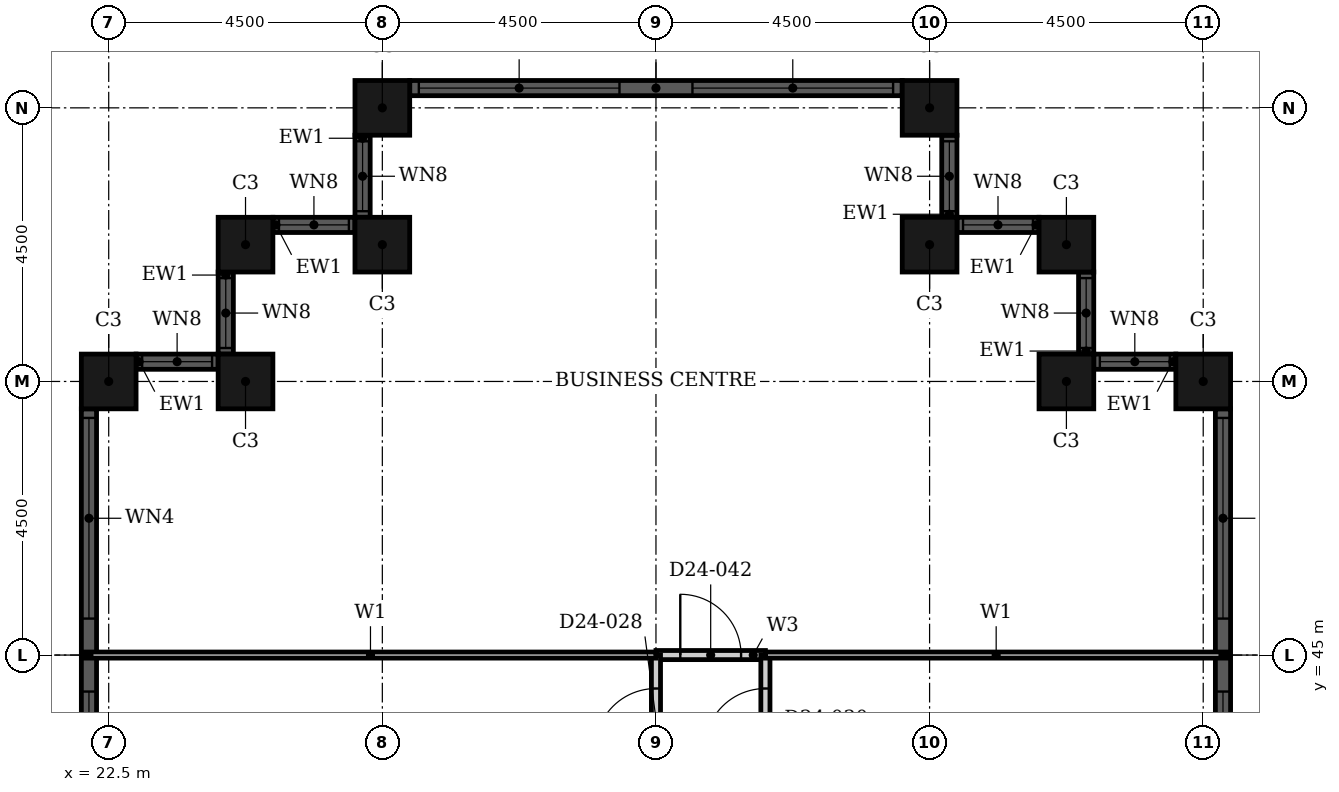
"""IFC4 building model, lengths in metres.
Left out: names, types, materials, properties, quantities, classifications, styles, units other than length and angle.
Written with IfcOpenShell. Run it as: python <this file> out.ifc"""

import sys

from ifc_helpers import new_model, si_unit, direction, frame, frame_2d, origin, origin_2d, place, context, subcontext, project, spatial, rectangle, hollow_rectangle, extrude, element, fill, save


model = new_model("IFC4")
c1 = context("Model", 3, precision=1e-05, world=origin(), true_north=direction((0.0, 1.0)))
c2 = subcontext(c1, "Body", "Model", "MODEL_VIEW")
j1 = project(units=[si_unit("LENGTHUNIT", "METRE"), si_unit("PLANEANGLEUNIT", "RADIAN")], contexts=[c1])
p1 = place(None, origin())
s1 = spatial("IfcSite", under=j1, at=p1, CompositionType="ELEMENT")
p2 = place(p1, origin())
s2 = spatial("IfcBuilding", under=s1, at=p2, CompositionType="ELEMENT")
p3 = place(p2, frame((0.0, 0.0, 100.8)))
s3 = spatial("IfcBuildingStorey", under=s2, at=p3, CompositionType="ELEMENT", Elevation=100.8)
for number, where, z_axis, x_axis in (
    (1, (40.5, 49.5, 0.0), (0.0, 0.0, 1.0), (1.0, 0.0, 0.0)),
    (2, (38.25, 49.5, 0.0), (0.0, 0.0, 1.0), (1.0, 0.0, 0.0)),
    (3, (38.25, 51.75, 0.0), (0.0, 0.0, 1.0), (1.0, 0.0, 0.0)),
    (4, (36.0, 51.75, 0.0), (0.0, 0.0, 1.0), (1.0, 0.0, 0.0)),
    (5, (36.0, 54.0, 0.0), (0.0, 0.0, 1.0), (1.0, 0.0, 0.0)),
    (6, (27.0, 54.0, 0.0), (0.0, 0.0, 1.0), (1.0, 0.0, 0.0)),
    (7, (27.0, 51.75, 0.0), (0.0, 0.0, 1.0), (1.0, 0.0, 0.0)),
    (8, (24.75, 51.75, 0.0), (0.0, 0.0, 1.0), (1.0, 0.0, 0.0)),
    (9, (24.75, 49.5, 0.0), (0.0, 0.0, 1.0), (1.0, 0.0, 0.0)),
    (10, (22.5, 49.5, 0.0), (0.0, 0.0, 1.0), (1.0, 0.0, 0.0)),
):
    element("IfcColumn", number, at=place(p3, frame(where, z_axis=z_axis, x_axis=x_axis)), inside=s3, PredefinedType="COLUMN", context=c2, shape_type="SweptSolid", body=[
        extrude(hollow_rectangle(XDim=0.9, YDim=0.9, WallThickness=0.028, at=origin_2d()), origin(), (0.0, 0.0, 1.0), 3.6),
    ])
p4 = place(p3, frame((40.825, 40.95, 0.0), z_axis=(0.0, 0.0, 1.0), x_axis=(0.0, 1.0, 0.0)))
e11 = element("IfcWall", 11, at=p4, inside=s3, PredefinedType="SOLIDWALL", context=c2, shape_type="SweptSolid", body=[
    extrude(rectangle(XDim=8.1, YDim=0.25, at=frame_2d((4.05, 0.0))), origin(), (0.0, 0.0, 1.0), 3.6),
])
p5 = place(p4, frame((0.15, 0.0, 0.9)))
e12 = element("IfcOpeningElement", 12, at=p5, cuts=e11, PredefinedType="OPENING", context=c2, shape_type="SweptSolid", body=[
    extrude(rectangle(XDim=3.3, YDim=2.08, at=frame_2d((1.65, 1.04))), frame((0.0, 0.135, 0.0), z_axis=(0.0, -1.0, 0.0), x_axis=(1.0, 0.0, 0.0)), (0.0, 0.0, 1.0), 0.27),
])
p6 = place(p4, frame((4.65, 0.0, 0.9)))
e13 = element("IfcOpeningElement", 13, at=p6, cuts=e11, PredefinedType="OPENING", context=c2, shape_type="SweptSolid", body=[
    extrude(rectangle(XDim=3.3, YDim=2.08, at=frame_2d((1.65, 1.04))), frame((0.0, 0.135, 0.0), z_axis=(0.0, -1.0, 0.0), x_axis=(1.0, 0.0, 0.0)), (0.0, 0.0, 1.0), 0.27),
])
p7 = place(p3, frame((40.05, 49.825, 0.0), z_axis=(0.0, 0.0, 1.0), x_axis=(-1.0, 0.0, 0.0)))
e14 = element("IfcWall", 14, at=p7, inside=s3, PredefinedType="SOLIDWALL", context=c2, shape_type="SweptSolid", body=[
    extrude(rectangle(XDim=1.35, YDim=0.25, at=frame_2d((0.675, 0.0))), origin(), (0.0, 0.0, 1.0), 3.6),
])
p8 = place(p7, frame((0.1, 0.0, 0.9)))
e15 = element("IfcOpeningElement", 15, at=p8, cuts=e14, PredefinedType="OPENING", context=c2, shape_type="SweptSolid", body=[
    extrude(rectangle(XDim=1.15, YDim=2.08, at=frame_2d((0.575, 1.04))), frame((0.0, 0.135, 0.0), z_axis=(0.0, -1.0, 0.0), x_axis=(1.0, 0.0, 0.0)), (0.0, 0.0, 1.0), 0.27),
])
p9 = place(p3, frame((38.575, 49.95, 0.0), z_axis=(0.0, 0.0, 1.0), x_axis=(0.0, 1.0, 0.0)))
e16 = element("IfcWall", 16, at=p9, inside=s3, PredefinedType="SOLIDWALL", context=c2, shape_type="SweptSolid", body=[
    extrude(rectangle(XDim=1.35, YDim=0.25, at=frame_2d((0.675, 0.0))), origin(), (0.0, 0.0, 1.0), 3.6),
])
p10 = place(p9, frame((0.1, 0.0, 0.9)))
e17 = element("IfcOpeningElement", 17, at=p10, cuts=e16, PredefinedType="OPENING", context=c2, shape_type="SweptSolid", body=[
    extrude(rectangle(XDim=1.15, YDim=2.08, at=frame_2d((0.575, 1.04))), frame((0.0, 0.135, 0.0), z_axis=(0.0, -1.0, 0.0), x_axis=(1.0, 0.0, 0.0)), (0.0, 0.0, 1.0), 0.27),
])
p11 = place(p3, frame((37.8, 52.075, 0.0), z_axis=(0.0, 0.0, 1.0), x_axis=(-1.0, 0.0, 0.0)))
e18 = element("IfcWall", 18, at=p11, inside=s3, PredefinedType="SOLIDWALL", context=c2, shape_type="SweptSolid", body=[
    extrude(rectangle(XDim=1.35, YDim=0.25, at=frame_2d((0.675, 0.0))), origin(), (0.0, 0.0, 1.0), 3.6),
])
p12 = place(p11, frame((0.1, 0.0, 0.9)))
e19 = element("IfcOpeningElement", 19, at=p12, cuts=e18, PredefinedType="OPENING", context=c2, shape_type="SweptSolid", body=[
    extrude(rectangle(XDim=1.15, YDim=2.08, at=frame_2d((0.575, 1.04))), frame((0.0, 0.135, 0.0), z_axis=(0.0, -1.0, 0.0), x_axis=(1.0, 0.0, 0.0)), (0.0, 0.0, 1.0), 0.27),
])
p13 = place(p3, frame((36.325, 52.2, 0.0), z_axis=(0.0, 0.0, 1.0), x_axis=(0.0, 1.0, 0.0)))
e20 = element("IfcWall", 20, at=p13, inside=s3, PredefinedType="SOLIDWALL", context=c2, shape_type="SweptSolid", body=[
    extrude(rectangle(XDim=1.35, YDim=0.25, at=frame_2d((0.675, 0.0))), origin(), (0.0, 0.0, 1.0), 3.6),
])
p14 = place(p13, frame((0.1, 0.0, 0.9)))
e21 = element("IfcOpeningElement", 21, at=p14, cuts=e20, PredefinedType="OPENING", context=c2, shape_type="SweptSolid", body=[
    extrude(rectangle(XDim=1.15, YDim=2.08, at=frame_2d((0.575, 1.04))), frame((0.0, 0.135, 0.0), z_axis=(0.0, -1.0, 0.0), x_axis=(1.0, 0.0, 0.0)), (0.0, 0.0, 1.0), 0.27),
])
p15 = place(p3, frame((35.55, 54.325, 0.0), z_axis=(0.0, 0.0, 1.0), x_axis=(-1.0, 0.0, 0.0)))
e22 = element("IfcWall", 22, at=p15, inside=s3, PredefinedType="SOLIDWALL", context=c2, shape_type="SweptSolid", body=[
    extrude(rectangle(XDim=8.1, YDim=0.25, at=frame_2d((4.05, 0.0))), origin(), (0.0, 0.0, 1.0), 3.6),
])
p16 = place(p15, frame((0.15, 0.0, 0.9)))
e23 = element("IfcOpeningElement", 23, at=p16, cuts=e22, PredefinedType="OPENING", context=c2, shape_type="SweptSolid", body=[
    extrude(rectangle(XDim=3.3, YDim=2.08, at=frame_2d((1.65, 1.04))), frame((0.0, 0.135, 0.0), z_axis=(0.0, -1.0, 0.0), x_axis=(1.0, 0.0, 0.0)), (0.0, 0.0, 1.0), 0.27),
])
p17 = place(p15, frame((4.65, 0.0, 0.9)))
e24 = element("IfcOpeningElement", 24, at=p17, cuts=e22, PredefinedType="OPENING", context=c2, shape_type="SweptSolid", body=[
    extrude(rectangle(XDim=3.3, YDim=2.08, at=frame_2d((1.65, 1.04))), frame((0.0, 0.135, 0.0), z_axis=(0.0, -1.0, 0.0), x_axis=(1.0, 0.0, 0.0)), (0.0, 0.0, 1.0), 0.27),
])
p18 = place(p3, frame((26.675, 53.55, 0.0), z_axis=(0.0, 0.0, 1.0), x_axis=(0.0, -1.0, 0.0)))
e25 = element("IfcWall", 25, at=p18, inside=s3, PredefinedType="SOLIDWALL", context=c2, shape_type="SweptSolid", body=[
    extrude(rectangle(XDim=1.35, YDim=0.25, at=frame_2d((0.675, 0.0))), origin(), (0.0, 0.0, 1.0), 3.6),
])
p19 = place(p18, frame((0.1, 0.0, 0.9)))
e26 = element("IfcOpeningElement", 26, at=p19, cuts=e25, PredefinedType="OPENING", context=c2, shape_type="SweptSolid", body=[
    extrude(rectangle(XDim=1.15, YDim=2.08, at=frame_2d((0.575, 1.04))), frame((0.0, 0.135, 0.0), z_axis=(0.0, -1.0, 0.0), x_axis=(1.0, 0.0, 0.0)), (0.0, 0.0, 1.0), 0.27),
])
p20 = place(p3, frame((26.55, 52.075, 0.0), z_axis=(0.0, 0.0, 1.0), x_axis=(-1.0, 0.0, 0.0)))
e27 = element("IfcWall", 27, at=p20, inside=s3, PredefinedType="SOLIDWALL", context=c2, shape_type="SweptSolid", body=[
    extrude(rectangle(XDim=1.35, YDim=0.25, at=frame_2d((0.675, 0.0))), origin(), (0.0, 0.0, 1.0), 3.6),
])
p21 = place(p20, frame((0.1, 0.0, 0.9)))
e28 = element("IfcOpeningElement", 28, at=p21, cuts=e27, PredefinedType="OPENING", context=c2, shape_type="SweptSolid", body=[
    extrude(rectangle(XDim=1.15, YDim=2.08, at=frame_2d((0.575, 1.04))), frame((0.0, 0.135, 0.0), z_axis=(0.0, -1.0, 0.0), x_axis=(1.0, 0.0, 0.0)), (0.0, 0.0, 1.0), 0.27),
])
p22 = place(p3, frame((24.425, 51.3, 0.0), z_axis=(0.0, 0.0, 1.0), x_axis=(0.0, -1.0, 0.0)))
e29 = element("IfcWall", 29, at=p22, inside=s3, PredefinedType="SOLIDWALL", context=c2, shape_type="SweptSolid", body=[
    extrude(rectangle(XDim=1.35, YDim=0.25, at=frame_2d((0.675, 0.0))), origin(), (0.0, 0.0, 1.0), 3.6),
])
p23 = place(p22, frame((0.1, 0.0, 0.9)))
e30 = element("IfcOpeningElement", 30, at=p23, cuts=e29, PredefinedType="OPENING", context=c2, shape_type="SweptSolid", body=[
    extrude(rectangle(XDim=1.15, YDim=2.08, at=frame_2d((0.575, 1.04))), frame((0.0, 0.135, 0.0), z_axis=(0.0, -1.0, 0.0), x_axis=(1.0, 0.0, 0.0)), (0.0, 0.0, 1.0), 0.27),
])
p24 = place(p3, frame((24.3, 49.825, 0.0), z_axis=(0.0, 0.0, 1.0), x_axis=(-1.0, 0.0, 0.0)))
e31 = element("IfcWall", 31, at=p24, inside=s3, PredefinedType="SOLIDWALL", context=c2, shape_type="SweptSolid", body=[
    extrude(rectangle(XDim=1.35, YDim=0.25, at=frame_2d((0.675, 0.0))), origin(), (0.0, 0.0, 1.0), 3.6),
])
p25 = place(p24, frame((0.1, 0.0, 0.9)))
e32 = element("IfcOpeningElement", 32, at=p25, cuts=e31, PredefinedType="OPENING", context=c2, shape_type="SweptSolid", body=[
    extrude(rectangle(XDim=1.15, YDim=2.08, at=frame_2d((0.575, 1.04))), frame((0.0, 0.135, 0.0), z_axis=(0.0, -1.0, 0.0), x_axis=(1.0, 0.0, 0.0)), (0.0, 0.0, 1.0), 0.27),
])
p26 = place(p3, frame((22.175, 49.05, 0.0), z_axis=(0.0, 0.0, 1.0), x_axis=(0.0, -1.0, 0.0)))
e33 = element("IfcWall", 33, at=p26, inside=s3, PredefinedType="SOLIDWALL", context=c2, shape_type="SweptSolid", body=[
    extrude(rectangle(XDim=8.1, YDim=0.25, at=frame_2d((4.05, 0.0))), origin(), (0.0, 0.0, 1.0), 3.6),
])
p27 = place(p26, frame((0.15, 0.0, 0.9)))
e34 = element("IfcOpeningElement", 34, at=p27, cuts=e33, PredefinedType="OPENING", context=c2, shape_type="SweptSolid", body=[
    extrude(rectangle(XDim=3.3, YDim=2.08, at=frame_2d((1.65, 1.04))), frame((0.0, 0.135, 0.0), z_axis=(0.0, -1.0, 0.0), x_axis=(1.0, 0.0, 0.0)), (0.0, 0.0, 1.0), 0.27),
])
p28 = place(p26, frame((4.65, 0.0, 0.9)))
e35 = element("IfcOpeningElement", 35, at=p28, cuts=e33, PredefinedType="OPENING", context=c2, shape_type="SweptSolid", body=[
    extrude(rectangle(XDim=3.3, YDim=2.08, at=frame_2d((1.65, 1.04))), frame((0.0, 0.135, 0.0), z_axis=(0.0, -1.0, 0.0), x_axis=(1.0, 0.0, 0.0)), (0.0, 0.0, 1.0), 0.27),
])
p29 = place(p3, frame((31.5, 45.0, 0.0), z_axis=(0.0, 0.0, 1.0), x_axis=(1.0, 0.0, 0.0)))
e36 = element("IfcWall", 36, at=p29, inside=s3, PredefinedType="PARTITIONING", context=c2, shape_type="SweptSolid", body=[
    extrude(rectangle(XDim=1.8, YDim=0.15, at=frame_2d((0.9, 0.0))), origin(), (0.0, 0.0, 1.0), 3.3),
])
p30 = place(p29, frame((0.4, 0.0, 0.0)))
e37 = element("IfcOpeningElement", 37, at=p30, cuts=e36, PredefinedType="OPENING", context=c2, shape_type="SweptSolid", body=[
    extrude(rectangle(XDim=1.0, YDim=2.1, at=frame_2d((0.5, 1.05))), frame((0.0, 0.085, 0.0), z_axis=(0.0, -1.0, 0.0), x_axis=(1.0, 0.0, 0.0)), (0.0, 0.0, 1.0), 0.17),
])
p31 = place(p3, frame((31.5, 33.3, 0.0), z_axis=(0.0, 0.0, 1.0), x_axis=(0.0, 1.0, 0.0)))
e38 = element("IfcWall", 38, at=p31, inside=s3, PredefinedType="PARTITIONING", context=c2, shape_type="SweptSolid", body=[
    extrude(rectangle(XDim=11.7, YDim=0.15, at=frame_2d((5.85, 0.0))), origin(), (0.0, 0.0, 1.0), 2.58),
])
p32 = place(p31, frame((10.15, 0.0, 0.0)))
e39 = element("IfcOpeningElement", 39, at=p32, cuts=e38, PredefinedType="OPENING", context=c2, shape_type="SweptSolid", body=[
    extrude(rectangle(XDim=1.0, YDim=2.1, at=frame_2d((0.5, 1.05))), frame((0.0, 0.085, 0.0), z_axis=(0.0, -1.0, 0.0), x_axis=(1.0, 0.0, 0.0)), (0.0, 0.0, 1.0), 0.17),
])
p33 = place(p3, frame((33.3, 33.3, 0.0), z_axis=(0.0, 0.0, 1.0), x_axis=(0.0, 1.0, 0.0)))
e40 = element("IfcWall", 40, at=p33, inside=s3, PredefinedType="PARTITIONING", context=c2, shape_type="SweptSolid", body=[
    extrude(rectangle(XDim=11.7, YDim=0.15, at=frame_2d((5.85, 0.0))), origin(), (0.0, 0.0, 1.0), 3.3),
])
p34 = place(p33, frame((10.15, 0.0, 0.0)))
e41 = element("IfcOpeningElement", 41, at=p34, cuts=e40, PredefinedType="OPENING", context=c2, shape_type="SweptSolid", body=[
    extrude(rectangle(XDim=1.0, YDim=2.1, at=frame_2d((0.5, 1.05))), frame((0.0, 0.085, 0.0), z_axis=(0.0, -1.0, 0.0), x_axis=(1.0, 0.0, 0.0)), (0.0, 0.0, 1.0), 0.17),
])
p35 = place(p3, frame((33.3, 45.0, 0.0), z_axis=(0.0, 0.0, 1.0), x_axis=(1.0, 0.0, 0.0)))
e42 = element("IfcWall", 42, at=p35, inside=s3, PredefinedType="PARTITIONING", context=c2, shape_type="SweptSolid", body=[
    extrude(rectangle(XDim=7.59, YDim=0.1, at=frame_2d((3.795, 0.0))), origin(), (0.0, 0.0, 1.0), 3.3),
])
p36 = place(p3, frame((22.11, 45.0, 0.0), z_axis=(0.0, 0.0, 1.0), x_axis=(1.0, 0.0, 0.0)))
e43 = element("IfcWall", 43, at=p36, inside=s3, PredefinedType="PARTITIONING", context=c2, shape_type="SweptSolid", body=[
    extrude(rectangle(XDim=9.39, YDim=0.1, at=frame_2d((4.695, 0.0))), origin(), (0.0, 0.0, 1.0), 3.3),
])
p37 = place(p5, origin())
e44 = element("IfcWindow", 44, at=p37, inside=s3, PartitioningType="SINGLE_PANEL", PredefinedType="WINDOW", context=c2, shape_type="SweptSolid", body=[
    extrude(rectangle(XDim=3.3, YDim=2.08, at=frame_2d((1.65, 1.04))), frame((0.0, 0.03, 0.0), z_axis=(0.0, -1.0, 0.0), x_axis=(1.0, 0.0, 0.0)), (0.0, 0.0, 1.0), 0.06),
])
fill(e12, e44)
p38 = place(p6, origin())
e45 = element("IfcWindow", 45, at=p38, inside=s3, PartitioningType="SINGLE_PANEL", PredefinedType="WINDOW", context=c2, shape_type="SweptSolid", body=[
    extrude(rectangle(XDim=3.3, YDim=2.08, at=frame_2d((1.65, 1.04))), frame((0.0, 0.03, 0.0), z_axis=(0.0, -1.0, 0.0), x_axis=(1.0, 0.0, 0.0)), (0.0, 0.0, 1.0), 0.06),
])
fill(e13, e45)
p39 = place(p8, origin())
e46 = element("IfcWindow", 46, at=p39, inside=s3, PartitioningType="SINGLE_PANEL", PredefinedType="WINDOW", context=c2, shape_type="SweptSolid", body=[
    extrude(rectangle(XDim=1.15, YDim=2.08, at=frame_2d((0.575, 1.04))), frame((0.0, 0.03, 0.0), z_axis=(0.0, -1.0, 0.0), x_axis=(1.0, 0.0, 0.0)), (0.0, 0.0, 1.0), 0.06),
])
fill(e15, e46)
p40 = place(p10, origin())
e47 = element("IfcWindow", 47, at=p40, inside=s3, PartitioningType="SINGLE_PANEL", PredefinedType="WINDOW", context=c2, shape_type="SweptSolid", body=[
    extrude(rectangle(XDim=1.15, YDim=2.08, at=frame_2d((0.575, 1.04))), frame((0.0, 0.03, 0.0), z_axis=(0.0, -1.0, 0.0), x_axis=(1.0, 0.0, 0.0)), (0.0, 0.0, 1.0), 0.06),
])
fill(e17, e47)
p41 = place(p12, origin())
e48 = element("IfcWindow", 48, at=p41, inside=s3, PartitioningType="SINGLE_PANEL", PredefinedType="WINDOW", context=c2, shape_type="SweptSolid", body=[
    extrude(rectangle(XDim=1.15, YDim=2.08, at=frame_2d((0.575, 1.04))), frame((0.0, 0.03, 0.0), z_axis=(0.0, -1.0, 0.0), x_axis=(1.0, 0.0, 0.0)), (0.0, 0.0, 1.0), 0.06),
])
fill(e19, e48)
p42 = place(p14, origin())
e49 = element("IfcWindow", 49, at=p42, inside=s3, PartitioningType="SINGLE_PANEL", PredefinedType="WINDOW", context=c2, shape_type="SweptSolid", body=[
    extrude(rectangle(XDim=1.15, YDim=2.08, at=frame_2d((0.575, 1.04))), frame((0.0, 0.03, 0.0), z_axis=(0.0, -1.0, 0.0), x_axis=(1.0, 0.0, 0.0)), (0.0, 0.0, 1.0), 0.06),
])
fill(e21, e49)
p43 = place(p16, origin())
e50 = element("IfcWindow", 50, at=p43, inside=s3, PartitioningType="SINGLE_PANEL", PredefinedType="WINDOW", context=c2, shape_type="SweptSolid", body=[
    extrude(rectangle(XDim=3.3, YDim=2.08, at=frame_2d((1.65, 1.04))), frame((0.0, 0.03, 0.0), z_axis=(0.0, -1.0, 0.0), x_axis=(1.0, 0.0, 0.0)), (0.0, 0.0, 1.0), 0.06),
])
fill(e23, e50)
p44 = place(p17, origin())
e51 = element("IfcWindow", 51, at=p44, inside=s3, PartitioningType="SINGLE_PANEL", PredefinedType="WINDOW", context=c2, shape_type="SweptSolid", body=[
    extrude(rectangle(XDim=3.3, YDim=2.08, at=frame_2d((1.65, 1.04))), frame((0.0, 0.03, 0.0), z_axis=(0.0, -1.0, 0.0), x_axis=(1.0, 0.0, 0.0)), (0.0, 0.0, 1.0), 0.06),
])
fill(e24, e51)
p45 = place(p19, origin())
e52 = element("IfcWindow", 52, at=p45, inside=s3, PartitioningType="SINGLE_PANEL", PredefinedType="WINDOW", context=c2, shape_type="SweptSolid", body=[
    extrude(rectangle(XDim=1.15, YDim=2.08, at=frame_2d((0.575, 1.04))), frame((0.0, 0.03, 0.0), z_axis=(0.0, -1.0, 0.0), x_axis=(1.0, 0.0, 0.0)), (0.0, 0.0, 1.0), 0.06),
])
fill(e26, e52)
p46 = place(p21, origin())
e53 = element("IfcWindow", 53, at=p46, inside=s3, PartitioningType="SINGLE_PANEL", PredefinedType="WINDOW", context=c2, shape_type="SweptSolid", body=[
    extrude(rectangle(XDim=1.15, YDim=2.08, at=frame_2d((0.575, 1.04))), frame((0.0, 0.03, 0.0), z_axis=(0.0, -1.0, 0.0), x_axis=(1.0, 0.0, 0.0)), (0.0, 0.0, 1.0), 0.06),
])
fill(e28, e53)
p47 = place(p23, origin())
e54 = element("IfcWindow", 54, at=p47, inside=s3, PartitioningType="SINGLE_PANEL", PredefinedType="WINDOW", context=c2, shape_type="SweptSolid", body=[
    extrude(rectangle(XDim=1.15, YDim=2.08, at=frame_2d((0.575, 1.04))), frame((0.0, 0.03, 0.0), z_axis=(0.0, -1.0, 0.0), x_axis=(1.0, 0.0, 0.0)), (0.0, 0.0, 1.0), 0.06),
])
fill(e30, e54)
p48 = place(p25, origin())
e55 = element("IfcWindow", 55, at=p48, inside=s3, PartitioningType="SINGLE_PANEL", PredefinedType="WINDOW", context=c2, shape_type="SweptSolid", body=[
    extrude(rectangle(XDim=1.15, YDim=2.08, at=frame_2d((0.575, 1.04))), frame((0.0, 0.03, 0.0), z_axis=(0.0, -1.0, 0.0), x_axis=(1.0, 0.0, 0.0)), (0.0, 0.0, 1.0), 0.06),
])
fill(e32, e55)
p49 = place(p27, origin())
e56 = element("IfcWindow", 56, at=p49, inside=s3, PartitioningType="SINGLE_PANEL", PredefinedType="WINDOW", context=c2, shape_type="SweptSolid", body=[
    extrude(rectangle(XDim=3.3, YDim=2.08, at=frame_2d((1.65, 1.04))), frame((0.0, 0.03, 0.0), z_axis=(0.0, -1.0, 0.0), x_axis=(1.0, 0.0, 0.0)), (0.0, 0.0, 1.0), 0.06),
])
fill(e34, e56)
p50 = place(p28, origin())
e57 = element("IfcWindow", 57, at=p50, inside=s3, PartitioningType="SINGLE_PANEL", PredefinedType="WINDOW", context=c2, shape_type="SweptSolid", body=[
    extrude(rectangle(XDim=3.3, YDim=2.08, at=frame_2d((1.65, 1.04))), frame((0.0, 0.03, 0.0), z_axis=(0.0, -1.0, 0.0), x_axis=(1.0, 0.0, 0.0)), (0.0, 0.0, 1.0), 0.06),
])
fill(e35, e57)
p51 = place(p32, origin())
e58 = element("IfcDoor", 58, at=p51, inside=s3, OperationType="SINGLE_SWING_RIGHT", PredefinedType="DOOR", context=c2, shape_type="SweptSolid", body=[
    extrude(rectangle(XDim=1.0, YDim=2.1, at=frame_2d((0.5, 1.05))), frame((0.0, 0.025, 0.0), z_axis=(0.0, -1.0, 0.0), x_axis=(1.0, 0.0, 0.0)), (0.0, 0.0, 1.0), 0.05),
])
fill(e39, e58)
p52 = place(p34, origin())
e59 = element("IfcDoor", 59, at=p52, inside=s3, OperationType="SINGLE_SWING_RIGHT", PredefinedType="DOOR", context=c2, shape_type="SweptSolid", body=[
    extrude(rectangle(XDim=1.0, YDim=2.1, at=frame_2d((0.5, 1.05))), frame((0.0, 0.025, 0.0), z_axis=(0.0, -1.0, 0.0), x_axis=(1.0, 0.0, 0.0)), (0.0, 0.0, 1.0), 0.05),
])
fill(e41, e59)
p53 = place(p30, origin())
e60 = element("IfcDoor", 60, at=p53, inside=s3, OperationType="SINGLE_SWING_LEFT", PredefinedType="DOOR", context=c2, shape_type="SweptSolid", body=[
    extrude(rectangle(XDim=1.0, YDim=2.1, at=frame_2d((0.5, 1.05))), frame((0.0, 0.025, 0.0), z_axis=(0.0, -1.0, 0.0), x_axis=(1.0, 0.0, 0.0)), (0.0, 0.0, 1.0), 0.05),
])
fill(e37, e60)
save(model, sys.argv[1])
